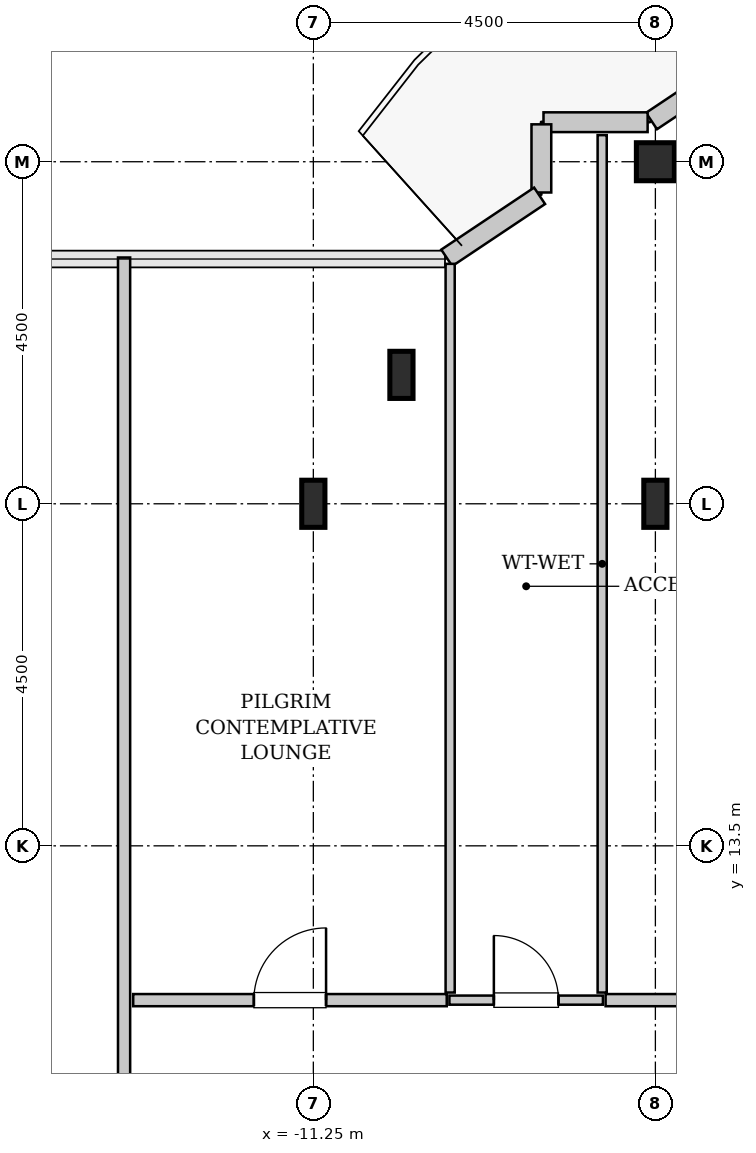
"""IFC4 building model, lengths in metres.
Left out: names, types, materials, properties, quantities, classifications, styles, units other than length and angle.
Written with IfcOpenShell. Run it as: python <this file> out.ifc"""

import sys

from ifc_helpers import new_model, si_unit, direction, frame, frame_2d, origin, origin_2d, place, context, subcontext, project, spatial, rectangle, hollow_rectangle, i_section, extrude, source, transform, mapped, element, fill, save


model = new_model("IFC4")
c1 = context("Model", 3, precision=1e-05, world=origin(), true_north=direction((0.0, 1.0)))
c2 = subcontext(c1, "Body", "Model", "MODEL_VIEW")
j1 = project(units=[si_unit("LENGTHUNIT", "METRE"), si_unit("PLANEANGLEUNIT", "RADIAN")], contexts=[c1])
p1 = place(None, origin())
s1 = spatial("IfcSite", under=j1, at=p1, CompositionType="ELEMENT")
p2 = place(p1, origin())
s2 = spatial("IfcBuilding", under=s1, at=p2, CompositionType="ELEMENT")
p3 = place(p2, frame((0.0, 0.0, 314.0)))
s3 = spatial("IfcBuildingStorey", under=s2, at=p3, CompositionType="ELEMENT", Elevation=314.0)
m1 = source(origin(), c2, "Body", "SweptSolid", [
    extrude(i_section(OverallWidth=0.305, OverallDepth=0.62, WebThickness=0.021, FlangeThickness=0.04, FilletRadius=0.027, at=origin_2d()), origin(), (0.0, 0.0, 1.0), 3.8),
])
for number, where, z_axis, x_axis in (
    (1, (-11.25, 18.0, 0.0), (0.0, 0.0, 1.0), (1.0, 0.0, 0.0)),
    (2, (-10.091, 19.696, 0.0), (0.0, 0.0, 1.0), (1.0, 0.0, 0.0)),
    (3, (-6.75, 18.0, 0.0), (0.0, 0.0, 1.0), (1.0, 0.0, 0.0)),
):
    element("IfcColumn", number, at=place(p3, frame(where, z_axis=z_axis, x_axis=x_axis)), inside=s3, PredefinedType="COLUMN", context=c2, shape_type="MappedRepresentation", body=[
        mapped(m1, transform((0.0, 0.0, 0.0), x_axis=(1.0, 0.0, 0.0), y_axis=(0.0, 1.0, 0.0), z_axis=(0.0, 0.0, 1.0), scale=1.0)),
    ])
m2 = source(origin(), c2, "Body", "SweptSolid", [
    extrude(hollow_rectangle(XDim=0.5, YDim=0.5, WallThickness=0.025, InnerFilletRadius=0.025, OuterFilletRadius=0.05, at=origin_2d()), origin(), (0.0, 0.0, 1.0), 3.8),
])
p4 = place(p3, frame((-6.75, 22.5, 0.0), z_axis=(0.0, 0.0, 1.0), x_axis=(1.0, 0.0, 0.0)))
e4 = element("IfcColumn", 4, at=p4, inside=s3, PredefinedType="COLUMN", context=c2, shape_type="MappedRepresentation", body=[
    mapped(m2, transform((0.0, 0.0, 0.0), x_axis=(1.0, 0.0, 0.0), y_axis=(0.0, 1.0, 0.0), z_axis=(0.0, 0.0, 1.0), scale=1.0)),
])
m3 = source(origin(), c2, "Body", "SweptSolid", [
    extrude(rectangle(XDim=0.565, YDim=0.26, at=frame_2d((0.283, 0.0))), origin(), (0.0, 0.0, 1.0), 3.5),
])
p5 = place(p3, frame((-6.331, 23.35, 0.0), z_axis=(0.0, 0.0, 1.0), x_axis=(-0.831651492666, -0.555297933317, 0.0)))
e5 = element("IfcWall", 5, at=p5, inside=s3, PredefinedType="SOLIDWALL", context=c2, shape_type="MappedRepresentation", body=[
    mapped(m3, transform((0.0, 0.0, 0.0), x_axis=(1.0, 0.0, 0.0), y_axis=(0.0, 1.0, 0.0), z_axis=(0.0, 0.0, 1.0), scale=1.0)),
])
m4 = source(origin(), c2, "Body", "SweptSolid", [
    extrude(rectangle(XDim=1.37, YDim=0.26, at=frame_2d((0.685, 0.0))), origin(), (0.0, 0.0, 1.0), 3.5),
])
p6 = place(p3, frame((-6.852, 23.02, 0.0), z_axis=(0.0, 0.0, 1.0), x_axis=(-1.0, 0.0, 0.0)))
e6 = element("IfcWall", 6, at=p6, inside=s3, PredefinedType="SOLIDWALL", context=c2, shape_type="MappedRepresentation", body=[
    mapped(m4, transform((0.0, 0.0, 0.0), x_axis=(1.0, 0.0, 0.0), y_axis=(0.0, 1.0, 0.0), z_axis=(0.0, 0.0, 1.0), scale=1.0)),
])
m5 = source(origin(), c2, "Body", "SweptSolid", [
    extrude(rectangle(XDim=0.897, YDim=0.26, at=frame_2d((0.448, 0.0))), origin(), (0.0, 0.0, 1.0), 3.5),
])
p7 = place(p3, frame((-8.25, 22.992, 0.0), z_axis=(0.0, 0.0, 1.0), x_axis=(0.0, -1.0, 0.0)))
e7 = element("IfcWall", 7, at=p7, inside=s3, PredefinedType="SOLIDWALL", context=c2, shape_type="MappedRepresentation", body=[
    mapped(m5, transform((0.0, 0.0, 0.0), x_axis=(1.0, 0.0, 0.0), y_axis=(0.0, 1.0, 0.0), z_axis=(0.0, 0.0, 1.0), scale=1.0)),
])
m6 = source(origin(), c2, "Body", "SweptSolid", [
    extrude(rectangle(XDim=1.469, YDim=0.26, at=frame_2d((0.734, 0.0))), origin(), (0.0, 0.0, 1.0), 3.5),
])
p8 = place(p3, frame((-8.273, 22.052, 0.0), z_axis=(0.0, 0.0, 1.0), x_axis=(-0.831461760506, -0.555581983884, 0.0)))
e8 = element("IfcWall", 8, at=p8, inside=s3, PredefinedType="SOLIDWALL", context=c2, shape_type="MappedRepresentation", body=[
    mapped(m6, transform((0.0, 0.0, 0.0), x_axis=(1.0, 0.0, 0.0), y_axis=(0.0, 1.0, 0.0), z_axis=(0.0, 0.0, 1.0), scale=1.0)),
])
m7 = source(origin(), c2, "Body", "SweptSolid", [
    extrude(rectangle(XDim=2.02, YDim=0.12, at=frame_2d((1.01, 0.0))), origin(), (0.0, 0.0, 1.0), 3.485),
])
p9 = place(p3, frame((-9.46, 11.47, 0.0), z_axis=(0.0, 0.0, 1.0), x_axis=(1.0, 0.0, 0.0)))
e9 = element("IfcWall", 9, at=p9, inside=s3, PredefinedType="PLUMBINGWALL", context=c2, shape_type="MappedRepresentation", body=[
    mapped(m7, transform((0.0, 0.0, 0.0), x_axis=(1.0, 0.0, 0.0), y_axis=(0.0, 1.0, 0.0), z_axis=(0.0, 0.0, 1.0), scale=1.0)),
])
p10 = place(p9, frame((0.585, 0.0, 0.0)))
e10 = element("IfcOpeningElement", 10, at=p10, cuts=e9, PredefinedType="OPENING", context=c2, shape_type="SweptSolid", body=[
    extrude(rectangle(XDim=0.85, YDim=2.1, at=frame_2d((0.425, 1.05))), frame((0.0, 0.07, 0.0), z_axis=(0.0, -1.0, 0.0), x_axis=(1.0, 0.0, 0.0)), (0.0, 0.0, 1.0), 0.14),
])
m8 = source(origin(), c2, "Body", "SweptSolid", [
    extrude(rectangle(XDim=11.28, YDim=0.12, at=frame_2d((5.64, 0.0))), origin(), (0.0, 0.0, 1.0), 3.485),
])
p11 = place(p3, frame((-7.45, 11.57, 0.0), z_axis=(0.0, 0.0, 1.0), x_axis=(0.0, 1.0, 0.0)))
e11 = element("IfcWall", 11, at=p11, inside=s3, PredefinedType="PLUMBINGWALL", context=c2, shape_type="MappedRepresentation", body=[
    mapped(m8, transform((0.0, 0.0, 0.0), x_axis=(1.0, 0.0, 0.0), y_axis=(0.0, 1.0, 0.0), z_axis=(0.0, 0.0, 1.0), scale=1.0)),
])
m9 = source(origin(), c2, "Body", "SweptSolid", [
    extrude(rectangle(XDim=9.587, YDim=0.12, at=frame_2d((4.793, 0.0))), origin(), (0.0, 0.0, 1.0), 3.485),
])
p12 = place(p3, frame((-9.45, 11.57, 0.0), z_axis=(0.0, 0.0, 1.0), x_axis=(0.0, 1.0, 0.0)))
e12 = element("IfcWall", 12, at=p12, inside=s3, PredefinedType="PLUMBINGWALL", context=c2, shape_type="MappedRepresentation", body=[
    mapped(m9, transform((0.0, 0.0, 0.0), x_axis=(1.0, 0.0, 0.0), y_axis=(0.0, 1.0, 0.0), z_axis=(0.0, 0.0, 1.0), scale=1.0)),
])
m10 = source(origin(), c2, "Body", "SweptSolid", [
    extrude(rectangle(XDim=13.153, YDim=0.16, at=frame_2d((6.576, 0.0))), origin(), (0.0, 0.0, 1.0), 3.485),
])
p13 = place(p3, frame((-13.74, 8.087, 0.0), z_axis=(0.0, 0.0, 1.0), x_axis=(0.0, 1.0, 0.0)))
e13 = element("IfcWall", 13, at=p13, inside=s3, PredefinedType="PARTITIONING", context=c2, shape_type="MappedRepresentation", body=[
    mapped(m10, transform((0.0, 0.0, 0.0), x_axis=(1.0, 0.0, 0.0), y_axis=(0.0, 1.0, 0.0), z_axis=(0.0, 0.0, 1.0), scale=1.0)),
])
p14 = place(p13, frame((1.236, 0.0, 0.0)))
e14 = element("IfcOpeningElement", 14, at=p14, cuts=e13, PredefinedType="OPENING", context=c2, shape_type="SweptSolid", body=[
    extrude(rectangle(XDim=0.95, YDim=2.1, at=frame_2d((0.475, 1.05))), frame((0.0, 0.09, 0.0), z_axis=(0.0, -1.0, 0.0), x_axis=(1.0, 0.0, 0.0)), (0.0, 0.0, 1.0), 0.18),
])
m11 = source(origin(), c2, "Body", "SweptSolid", [
    extrude(rectangle(XDim=4.125, YDim=0.16, at=frame_2d((2.062, 0.0))), origin(), (0.0, 0.0, 1.0), 3.485),
])
p15 = place(p3, frame((-13.62, 11.47, 0.0), z_axis=(0.0, 0.0, 1.0), x_axis=(1.0, 0.0, 0.0)))
e15 = element("IfcWall", 15, at=p15, inside=s3, PredefinedType="PARTITIONING", context=c2, shape_type="MappedRepresentation", body=[
    mapped(m11, transform((0.0, 0.0, 0.0), x_axis=(1.0, 0.0, 0.0), y_axis=(0.0, 1.0, 0.0), z_axis=(0.0, 0.0, 1.0), scale=1.0)),
])
p16 = place(p15, frame((1.587, 0.0, 0.0)))
e16 = element("IfcOpeningElement", 16, at=p16, cuts=e15, PredefinedType="OPENING", context=c2, shape_type="SweptSolid", body=[
    extrude(rectangle(XDim=0.95, YDim=2.1, at=frame_2d((0.475, 1.05))), frame((0.0, 0.09, 0.0), z_axis=(0.0, -1.0, 0.0), x_axis=(1.0, 0.0, 0.0)), (0.0, 0.0, 1.0), 0.18),
])
m12 = source(origin(), c2, "Body", "SweptSolid", [
    extrude(rectangle(XDim=5.605, YDim=0.16, at=frame_2d((2.802, 0.0))), origin(), (0.0, 0.0, 1.0), 3.485),
])
p17 = place(p3, frame((-7.405, 11.47, 0.0), z_axis=(0.0, 0.0, 1.0), x_axis=(1.0, 0.0, 0.0)))
e17 = element("IfcWall", 17, at=p17, inside=s3, PredefinedType="PARTITIONING", context=c2, shape_type="MappedRepresentation", body=[
    mapped(m12, transform((0.0, 0.0, 0.0), x_axis=(1.0, 0.0, 0.0), y_axis=(0.0, 1.0, 0.0), z_axis=(0.0, 0.0, 1.0), scale=1.0)),
])
p18 = place(p17, frame((2.327, 0.0, 0.0)))
e18 = element("IfcOpeningElement", 18, at=p18, cuts=e17, PredefinedType="OPENING", context=c2, shape_type="SweptSolid", body=[
    extrude(rectangle(XDim=0.95, YDim=2.1, at=frame_2d((0.475, 1.05))), frame((0.0, 0.09, 0.0), z_axis=(0.0, -1.0, 0.0), x_axis=(1.0, 0.0, 0.0)), (0.0, 0.0, 1.0), 0.18),
])
m13 = source(origin(), c2, "Body", "SweptSolid", [
    extrude(rectangle(XDim=0.85, YDim=2.1, at=frame_2d((0.425, 1.05))), frame((0.0, 0.025, 0.0), z_axis=(0.0, -1.0, 0.0), x_axis=(1.0, 0.0, 0.0)), (0.0, 0.0, 1.0), 0.05),
])
p19 = place(p10, origin())
e19 = element("IfcDoor", 19, at=p19, inside=s3, OperationType="SINGLE_SWING_LEFT", PredefinedType="DOOR", context=c2, shape_type="MappedRepresentation", body=[
    mapped(m13, transform((0.0, 0.0, 0.0), x_axis=(1.0, 0.0, 0.0), y_axis=(0.0, 1.0, 0.0), z_axis=(0.0, 0.0, 1.0), scale=1.0)),
])
fill(e10, e19)
m14 = source(origin(), c2, "Body", "SweptSolid", [
    extrude(rectangle(XDim=0.95, YDim=2.1, at=frame_2d((0.475, 1.05))), frame((0.0, 0.025, 0.0), z_axis=(0.0, -1.0, 0.0), x_axis=(1.0, 0.0, 0.0)), (0.0, 0.0, 1.0), 0.05),
])
p20 = place(p16, origin())
e20 = element("IfcDoor", 20, at=p20, inside=s3, OperationType="SINGLE_SWING_RIGHT", PredefinedType="DOOR", context=c2, shape_type="MappedRepresentation", body=[
    mapped(m14, transform((0.0, 0.0, 0.0), x_axis=(1.0, 0.0, 0.0), y_axis=(0.0, 1.0, 0.0), z_axis=(0.0, 0.0, 1.0), scale=1.0)),
])
fill(e16, e20)
save(model, sys.argv[1])
